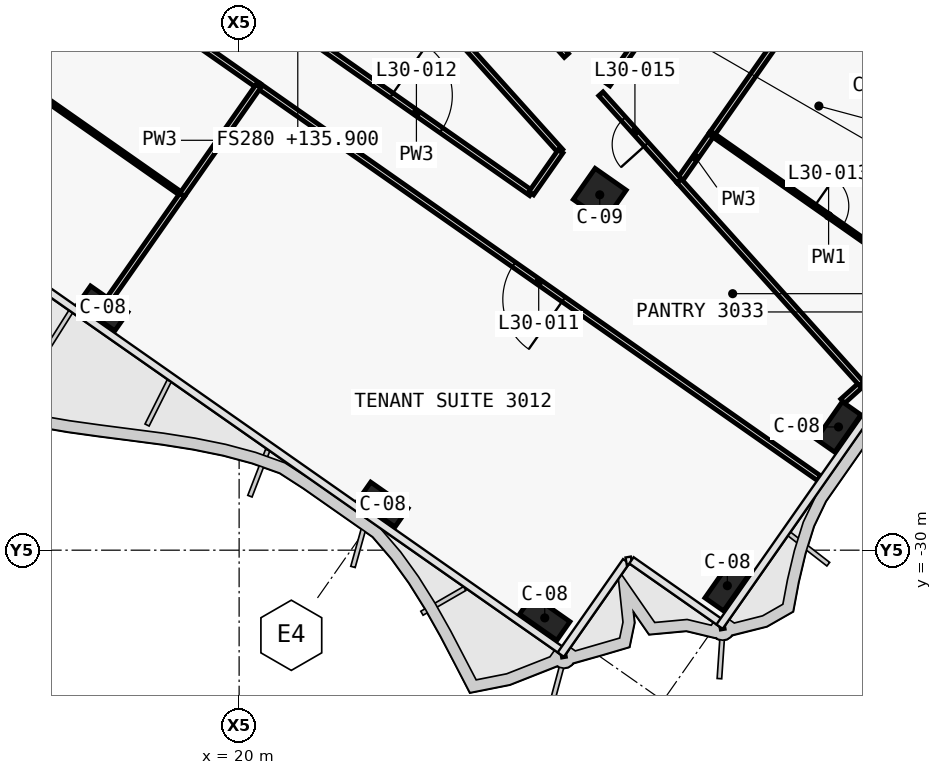
"""IFC4 building model, lengths in metres.
Left out: names, types, materials, properties, quantities, classifications, styles, units other than length and angle.
Written with IfcOpenShell. Run it as: python <this file> out.ifc"""

import sys

from ifc_helpers import new_model, si_unit, direction, frame, frame_2d, origin, origin_2d, place, context, subcontext, project, spatial, rectangle, extrude, element, fill, save


model = new_model("IFC4")
c1 = context("Model", 3, precision=1e-05, world=origin(), true_north=direction((0.0, 1.0)))
c2 = subcontext(c1, "Body", "Model", "MODEL_VIEW")
j1 = project(units=[si_unit("LENGTHUNIT", "METRE"), si_unit("PLANEANGLEUNIT", "RADIAN")], contexts=[c1])
p1 = place(None, origin())
s1 = spatial("IfcSite", under=j1, at=p1, CompositionType="ELEMENT")
p2 = place(p1, origin())
s2 = spatial("IfcBuilding", under=s1, at=p2, CompositionType="ELEMENT")
p3 = place(p2, frame((0.0, 0.0, 135.9)))
s3 = spatial("IfcBuildingStorey", under=s2, at=p3, CompositionType="ELEMENT", Elevation=135.9)
for number, where, z_axis, x_axis in (
    (1, (16.41, -23.637, 0.0), (0.0, 0.0, 1.0), (0.819, -0.574, 0.0)),
    (2, (23.782, -28.799, 0.0), (0.0, 0.0, 1.0), (0.819, -0.574, 0.0)),
    (3, (28.042, -31.782, 0.0), (0.0, 0.0, 1.0), (0.819, -0.574, 0.0)),
    (4, (32.847, -30.935, 0.0), (0.0, 0.0, 1.0), (0.574, 0.819, 0.0)),
    (5, (35.772, -26.757, 0.0), (0.0, 0.0, 1.0), (0.574, 0.819, 0.0)),
):
    element("IfcColumn", number, at=place(p3, frame(where, z_axis=z_axis, x_axis=x_axis)), inside=s3, PredefinedType="COLUMN", context=c2, shape_type="SweptSolid", body=[
        extrude(rectangle(XDim=1.2, YDim=0.6, at=origin_2d()), origin(), (0.0, 0.0, 1.0), 3.9),
    ])
p4 = place(p3, frame((29.49, -20.649, 0.0), z_axis=(0.0, 0.0, 1.0), x_axis=(0.819152044289, -0.573576436351, 0.0)))
e6 = element("IfcColumn", 6, at=p4, inside=s3, PredefinedType="COLUMN", context=c2, shape_type="SweptSolid", body=[
    extrude(rectangle(XDim=1.0, YDim=1.0, at=origin_2d()), origin(), (0.0, 0.0, 1.0), 3.9),
])
p5 = place(p3, frame((21.642, -16.375, 0.0), z_axis=(0.0, 0.0, 1.0), x_axis=(0.819148008851, -0.573582199511, 0.0)))
e7 = element("IfcWall", 7, at=p5, inside=s3, PredefinedType="PARTITIONING", context=c2, shape_type="SweptSolid", body=[
    extrude(rectangle(XDim=7.382, YDim=0.15, at=frame_2d((3.691, 0.0))), origin(), (0.0, 0.0, 1.0), 3.0),
])
p6 = place(p5, frame((2.891, 0.0, 0.0)))
e8 = element("IfcOpeningElement", 8, at=p6, cuts=e7, PredefinedType="OPENING", context=c2, shape_type="SweptSolid", body=[
    extrude(rectangle(XDim=1.6, YDim=2.1, at=frame_2d((0.8, 1.05))), frame((0.0, 0.085, 0.0), z_axis=(0.0, -1.0, 0.0), x_axis=(1.0, 0.0, 0.0)), (0.0, 0.0, 1.0), 0.17),
])
p7 = place(p3, frame((20.513, -17.781, 0.0), z_axis=(0.0, 0.0, 1.0), x_axis=(-0.81916437852, 0.57355882084, 0.0)))
e9 = element("IfcWall", 9, at=p7, inside=s3, PredefinedType="PARTITIONING", context=c2, shape_type="SweptSolid", body=[
    extrude(rectangle(XDim=18.002, YDim=0.15, at=frame_2d((9.001, 0.0))), origin(), (0.0, 0.0, 1.0), 3.0),
])
p8 = place(p7, frame((8.201, 0.0, 0.0)))
e10 = element("IfcOpeningElement", 10, at=p8, cuts=e9, PredefinedType="OPENING", context=c2, shape_type="SweptSolid", body=[
    extrude(rectangle(XDim=1.6, YDim=2.1, at=frame_2d((0.8, 1.05))), frame((0.0, 0.085, 0.0), z_axis=(0.0, -1.0, 0.0), x_axis=(1.0, 0.0, 0.0)), (0.0, 0.0, 1.0), 0.17),
])
p9 = place(p3, frame((35.256, -28.104, 0.0), z_axis=(0.0, 0.0, 1.0), x_axis=(-0.819170750417, 0.573549720305, 0.0)))
e11 = element("IfcWall", 11, at=p9, inside=s3, PredefinedType="PARTITIONING", context=c2, shape_type="SweptSolid", body=[
    extrude(rectangle(XDim=18.002, YDim=0.15, at=frame_2d((9.001, 0.0))), origin(), (0.0, 0.0, 1.0), 2.9),
])
p10 = place(p9, frame((8.201, 0.0, 0.0)))
e12 = element("IfcOpeningElement", 12, at=p10, cuts=e11, PredefinedType="OPENING", context=c2, shape_type="SweptSolid", body=[
    extrude(rectangle(XDim=1.6, YDim=2.1, at=frame_2d((0.8, 1.05))), frame((0.0, 0.085, 0.0), z_axis=(0.0, -1.0, 0.0), x_axis=(1.0, 0.0, 0.0)), (0.0, 0.0, 1.0), 0.17),
])
p11 = place(p3, frame((32.562, -13.645, 0.0), z_axis=(0.0, 0.0, 1.0), x_axis=(-0.573557394979, -0.819165376872, 0.0)))
e13 = element("IfcWall", 13, at=p11, inside=s3, PredefinedType="PARTITIONING", context=c2, shape_type="SweptSolid", body=[
    extrude(rectangle(XDim=4.999, YDim=0.15, at=frame_2d((2.5, 0.0))), origin(), (0.0, 0.0, 1.0), 3.0),
])
p12 = place(p3, frame((28.612, -16.981, 0.0), z_axis=(0.0, 0.0, 1.0), x_axis=(-0.668538381342, 0.743677640293, 0.0)))
e14 = element("IfcWall", 14, at=p12, inside=s3, PredefinedType="PARTITIONING", context=c2, shape_type="SweptSolid", body=[
    extrude(rectangle(XDim=4.494, YDim=0.15, at=frame_2d((2.247, 0.0))), origin(), (0.0, 0.0, 1.0), 3.62),
])
p13 = place(p12, frame((1.797, 0.0, 0.0)))
e15 = element("IfcOpeningElement", 15, at=p13, cuts=e14, PredefinedType="OPENING", context=c2, shape_type="SweptSolid", body=[
    extrude(rectangle(XDim=0.9, YDim=2.1, at=frame_2d((0.45, 1.05))), frame((0.0, 0.085, 0.0), z_axis=(0.0, -1.0, 0.0), x_axis=(1.0, 0.0, 0.0)), (0.0, 0.0, 1.0), 0.17),
])
p14 = place(p3, frame((24.548, -15.153, 0.0), z_axis=(0.0, 0.0, 1.0), x_axis=(0.668533527576, -0.743682003619, 0.0)))
e16 = element("IfcWall", 16, at=p14, inside=s3, PredefinedType="PARTITIONING", context=c2, shape_type="SweptSolid", body=[
    extrude(rectangle(XDim=5.851, YDim=0.15, at=frame_2d((2.926, 0.0))), origin(), (0.0, 0.0, 1.0), 3.62),
])
p15 = place(p3, frame((28.46, -19.504, 0.0), z_axis=(0.0, 0.0, 1.0), x_axis=(-0.573547503037, -0.819172302852, 0.0)))
e17 = element("IfcWall", 17, at=p15, inside=s3, PredefinedType="PARTITIONING", context=c2, shape_type="SweptSolid", body=[
    extrude(rectangle(XDim=1.347, YDim=0.15, at=frame_2d((0.673, 0.0))), origin(), (0.0, 0.0, 1.0), 3.0),
])
p16 = place(p3, frame((35.02, -15.365, 0.0), z_axis=(0.0, 0.0, 1.0), x_axis=(-0.573556991349, -0.819165659482, 0.0)))
e18 = element("IfcWall", 18, at=p16, inside=s3, PredefinedType="PARTITIONING", context=c2, shape_type="SweptSolid", body=[
    extrude(rectangle(XDim=4.501, YDim=0.15, at=frame_2d((2.25, 0.0))), origin(), (0.0, 0.0, 1.0), 2.9),
])
p17 = place(p3, frame((32.44, -19.05, 0.0), z_axis=(0.0, 0.0, 1.0), x_axis=(-0.573604109136, -0.8191326669, 0.0)))
e19 = element("IfcWall", 19, at=p17, inside=s3, PredefinedType="PARTITIONING", context=c2, shape_type="SweptSolid", body=[
    extrude(rectangle(XDim=1.502, YDim=0.15, at=frame_2d((0.751, 0.0))), origin(), (0.0, 0.0, 1.0), 3.62),
])
p18 = place(p3, frame((31.578, -20.281, 0.0), z_axis=(0.0, 0.0, 1.0), x_axis=(-0.668570426306, 0.743648831821, 0.0)))
e20 = element("IfcWall", 20, at=p18, inside=s3, PredefinedType="PARTITIONING", context=c2, shape_type="SweptSolid", body=[
    extrude(rectangle(XDim=3.079, YDim=0.15, at=frame_2d((1.54, 0.0))), origin(), (0.0, 0.0, 1.0), 3.0),
])
p19 = place(p18, frame((1.29, 0.0, 0.0)))
e21 = element("IfcOpeningElement", 21, at=p19, cuts=e20, PredefinedType="OPENING", context=c2, shape_type="SweptSolid", body=[
    extrude(rectangle(XDim=0.9, YDim=2.1, at=frame_2d((0.45, 1.05))), frame((0.0, 0.085, 0.0), z_axis=(0.0, -1.0, 0.0), x_axis=(1.0, 0.0, 0.0)), (0.0, 0.0, 1.0), 0.17),
])
p20 = place(p3, frame((32.439, -19.051, 0.0), z_axis=(0.0, 0.0, 1.0), x_axis=(0.819137093595, -0.573597787563, 0.0)))
e22 = element("IfcWall", 22, at=p20, inside=s3, PredefinedType="PARTITIONING", context=c2, shape_type="SweptSolid", body=[
    extrude(rectangle(XDim=7.5, YDim=0.1, at=frame_2d((3.75, 0.0))), origin(), (0.0, 0.0, 1.0), 2.9),
])
p21 = place(p20, frame((3.3, 0.0, 0.0)))
e23 = element("IfcOpeningElement", 23, at=p21, cuts=e22, PredefinedType="OPENING", context=c2, shape_type="SweptSolid", body=[
    extrude(rectangle(XDim=0.9, YDim=2.1, at=frame_2d((0.45, 1.05))), frame((0.0, 0.06, 0.0), z_axis=(0.0, -1.0, 0.0), x_axis=(1.0, 0.0, 0.0)), (0.0, 0.0, 1.0), 0.12),
])
p22 = place(p3, frame((35.883, -26.078, 0.0), z_axis=(0.0, 0.0, 1.0), x_axis=(0.743600238958, 0.668624472049, 0.0)))
e24 = element("IfcWall", 24, at=p22, inside=s3, PredefinedType="PARTITIONING", context=c2, shape_type="SweptSolid", body=[
    extrude(rectangle(XDim=0.674, YDim=0.15, at=frame_2d((0.337, 0.0))), origin(), (0.0, 0.0, 1.0), 2.9),
])
p23 = place(p3, frame((36.384, -25.627, 0.0), z_axis=(0.0, 0.0, 1.0), x_axis=(-0.668510527513, 0.743702678901, 0.0)))
e25 = element("IfcWall", 25, at=p23, inside=s3, PredefinedType="PARTITIONING", context=c2, shape_type="SweptSolid", body=[
    extrude(rectangle(XDim=7.189, YDim=0.15, at=frame_2d((3.594, 0.0))), origin(), (0.0, 0.0, 1.0), 2.9),
])
p24 = place(p3, frame((18.503, -20.648, 0.0), z_axis=(0.0, 0.0, 1.0), x_axis=(-0.819154173185, 0.573573395961, 0.0)))
e26 = element("IfcWall", 26, at=p24, inside=s3, PredefinedType="PARTITIONING", context=c2, shape_type="SweptSolid", body=[
    extrude(rectangle(XDim=18.0, YDim=0.1, at=frame_2d((9.0, 0.0))), origin(), (0.0, 0.0, 1.0), 3.0),
])
p25 = place(p24, frame((8.55, 0.0, 0.0)))
e27 = element("IfcOpeningElement", 27, at=p25, cuts=e26, PredefinedType="OPENING", context=c2, shape_type="SweptSolid", body=[
    extrude(rectangle(XDim=0.9, YDim=2.1, at=frame_2d((0.45, 1.05))), frame((0.0, 0.06, 0.0), z_axis=(0.0, -1.0, 0.0), x_axis=(1.0, 0.0, 0.0)), (0.0, 0.0, 1.0), 0.12),
])
p26 = place(p3, frame((18.503, -20.648, 0.0), z_axis=(0.0, 0.0, 1.0), x_axis=(-0.573560777794, -0.819163008306, 0.0)))
e28 = element("IfcWall", 28, at=p26, inside=s3, PredefinedType="PARTITIONING", context=c2, shape_type="SweptSolid", body=[
    extrude(rectangle(XDim=3.329, YDim=0.15, at=frame_2d((1.665, 0.0))), origin(), (0.0, 0.0, 1.0), 3.0),
])
p27 = place(p3, frame((20.511, -17.78, 0.0), z_axis=(0.0, 0.0, 1.0), x_axis=(-0.573551294295, -0.819169648371, 0.0)))
e29 = element("IfcWall", 29, at=p27, inside=s3, PredefinedType="PARTITIONING", context=c2, shape_type="SweptSolid", body=[
    extrude(rectangle(XDim=3.5, YDim=0.15, at=frame_2d((1.75, 0.0))), origin(), (0.0, 0.0, 1.0), 3.0),
])
p28 = place(p10, origin())
e30 = element("IfcDoor", 30, at=p28, inside=s3, OperationType="DOUBLE_DOOR_SINGLE_SWING", PredefinedType="DOOR", context=c2, shape_type="SweptSolid", body=[
    extrude(rectangle(XDim=1.6, YDim=2.1, at=frame_2d((0.8, 1.05))), frame((0.0, 0.025, 0.0), z_axis=(0.0, -1.0, 0.0), x_axis=(1.0, 0.0, 0.0)), (0.0, 0.0, 1.0), 0.05),
])
fill(e12, e30)
p29 = place(p6, origin())
e31 = element("IfcDoor", 31, at=p29, inside=s3, OperationType="DOUBLE_DOOR_SINGLE_SWING", PredefinedType="DOOR", context=c2, shape_type="SweptSolid", body=[
    extrude(rectangle(XDim=1.6, YDim=2.1, at=frame_2d((0.8, 1.05))), frame((0.0, 0.025, 0.0), z_axis=(0.0, -1.0, 0.0), x_axis=(1.0, 0.0, 0.0)), (0.0, 0.0, 1.0), 0.05),
])
fill(e8, e31)
p30 = place(p21, origin())
e32 = element("IfcDoor", 32, at=p30, inside=s3, OperationType="SINGLE_SWING_LEFT", PredefinedType="DOOR", context=c2, shape_type="SweptSolid", body=[
    extrude(rectangle(XDim=0.9, YDim=2.1, at=frame_2d((0.45, 1.05))), frame((0.0, 0.025, 0.0), z_axis=(0.0, -1.0, 0.0), x_axis=(1.0, 0.0, 0.0)), (0.0, 0.0, 1.0), 0.05),
])
fill(e23, e32)
p31 = place(p19, origin())
e33 = element("IfcDoor", 33, at=p31, inside=s3, OperationType="SINGLE_SWING_RIGHT", PredefinedType="DOOR", context=c2, shape_type="SweptSolid", body=[
    extrude(rectangle(XDim=0.9, YDim=2.1, at=frame_2d((0.45, 1.05))), frame((0.0, 0.025, 0.0), z_axis=(0.0, -1.0, 0.0), x_axis=(1.0, 0.0, 0.0)), (0.0, 0.0, 1.0), 0.05),
])
fill(e21, e33)
save(model, sys.argv[1])
